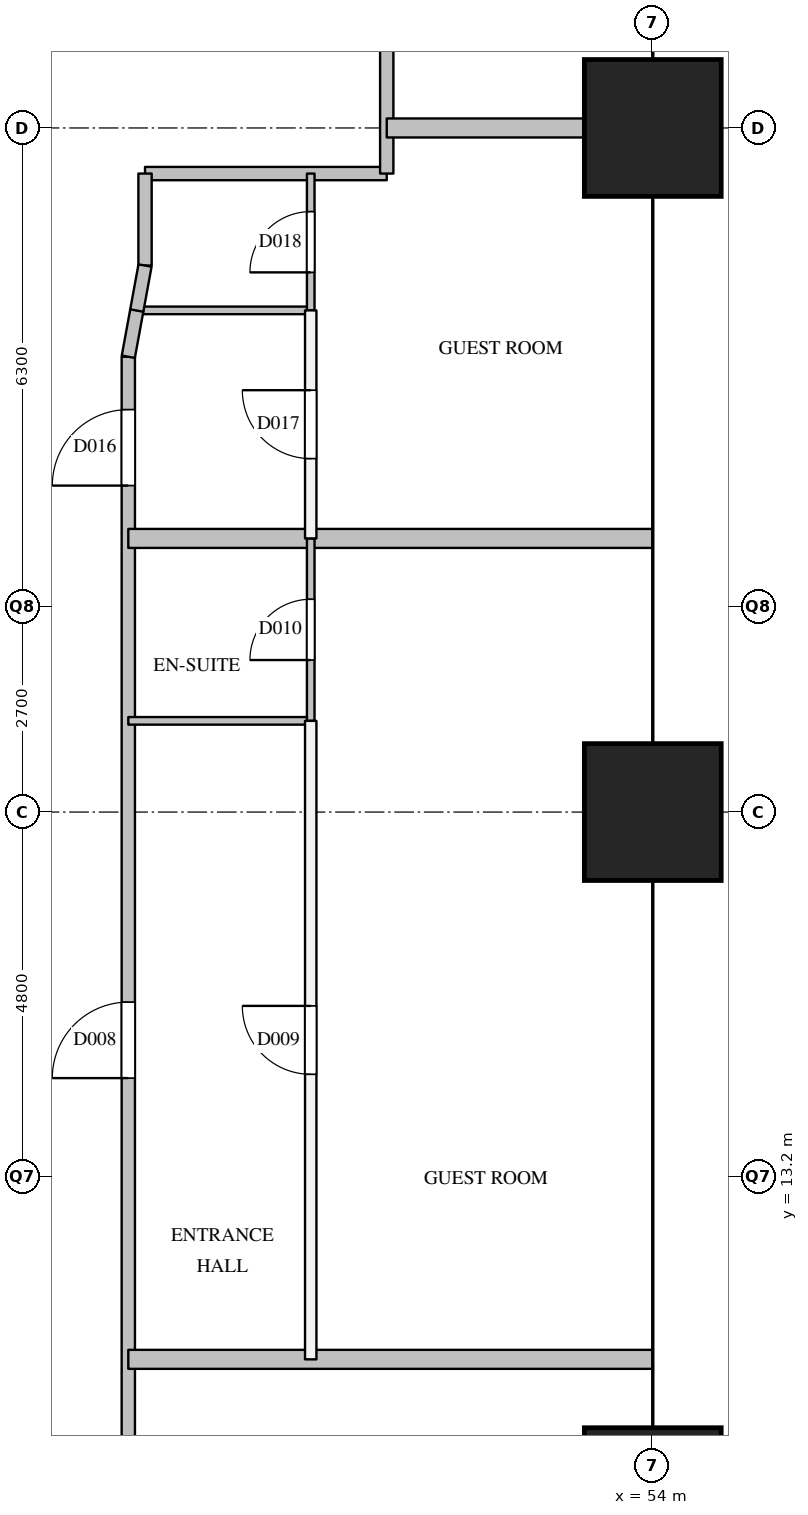
"""IFC4 building model, lengths in metres.
Left out: names, types, materials, properties, quantities, classifications, styles, units other than length and angle.
Written with IfcOpenShell. Run it as: python <this file> out.ifc"""

import sys

from ifc_helpers import new_model, si_unit, direction, frame, frame_2d, origin, origin_2d, place, context, subcontext, project, spatial, rectangle, extrude, element, fill, save


model = new_model("IFC4")
c1 = context("Model", 3, precision=1e-05, world=origin(), true_north=direction((0.0, 1.0)))
c2 = subcontext(c1, "Body", "Model", "MODEL_VIEW")
j1 = project(units=[si_unit("LENGTHUNIT", "METRE"), si_unit("PLANEANGLEUNIT", "RADIAN")], contexts=[c1])
p1 = place(None, origin())
s1 = spatial("IfcSite", under=j1, at=p1, CompositionType="ELEMENT")
p2 = place(p1, origin())
s2 = spatial("IfcBuilding", under=s1, at=p2, CompositionType="ELEMENT")
p3 = place(p2, frame((0.0, 0.0, 61.4)))
s3 = spatial("IfcBuildingStorey", under=s2, at=p3, CompositionType="ELEMENT", Elevation=61.4)
for number, where, z_axis, x_axis in (
    (1, (54.0, 9.0, 0.0), (0.0, 0.0, 1.0), (1.0, 0.0, 0.0)),
    (2, (54.0, 18.0, 0.0), (0.0, 0.0, 1.0), (1.0, 0.0, 0.0)),
    (3, (54.0, 27.0, 0.0), (0.0, 0.0, 1.0), (1.0, 0.0, 0.0)),
):
    element("IfcColumn", number, at=place(p3, frame(where, z_axis=z_axis, x_axis=x_axis)), inside=s3, PredefinedType="COLUMN", context=c2, shape_type="SweptSolid", body=[
        extrude(rectangle(XDim=1.8, YDim=1.8, at=origin_2d()), origin(), (0.0, 0.0, 1.0), 3.8),
    ])
p4 = place(p3, frame((47.32, 26.4, 0.0), z_axis=(0.0, 0.0, 1.0), x_axis=(1.0, 0.0, 0.0)))
e4 = element("IfcWall", 4, at=p4, inside=s3, PredefinedType="PARTITIONING", context=c2, shape_type="SweptSolid", body=[
    extrude(rectangle(XDim=3.18, YDim=0.175, at=frame_2d((1.59, 0.0))), origin(), (0.0, 0.0, 1.0), 3.5),
])
p5 = place(p3, frame((47.1, 6.9, 0.0), z_axis=(0.0, 0.0, 1.0), x_axis=(0.0, 1.0, 0.0)))
e5 = element("IfcWall", 5, at=p5, inside=s3, PredefinedType="PARTITIONING", context=c2, shape_type="SweptSolid", body=[
    extrude(rectangle(XDim=17.09, YDim=0.175, at=frame_2d((8.545, 0.0))), origin(), (0.0, 0.0, 1.0), 3.5),
])
p6 = place(p5, frame((7.6, 0.0, 0.0)))
e6 = element("IfcOpeningElement", 6, at=p6, cuts=e5, PredefinedType="OPENING", context=c2, shape_type="SweptSolid", body=[
    extrude(rectangle(XDim=1.0, YDim=2.1, at=frame_2d((0.5, 1.05))), frame((0.0, 0.097, 0.0), z_axis=(0.0, -1.0, 0.0), x_axis=(1.0, 0.0, 0.0)), (0.0, 0.0, 1.0), 0.195),
])
p7 = place(p5, frame((15.395, 0.0, 0.0)))
e7 = element("IfcOpeningElement", 7, at=p7, cuts=e5, PredefinedType="OPENING", context=c2, shape_type="SweptSolid", body=[
    extrude(rectangle(XDim=1.0, YDim=2.1, at=frame_2d((0.5, 1.05))), frame((0.0, 0.097, 0.0), z_axis=(0.0, -1.0, 0.0), x_axis=(1.0, 0.0, 0.0)), (0.0, 0.0, 1.0), 0.195),
])
p8 = place(p3, frame((47.32, 25.19, 0.0), z_axis=(0.0, 0.0, 1.0), x_axis=(0.0, 1.0, 0.0)))
e8 = element("IfcWall", 8, at=p8, inside=s3, PredefinedType="PARTITIONING", context=c2, shape_type="SweptSolid", body=[
    extrude(rectangle(XDim=1.21, YDim=0.175, at=frame_2d((0.605, 0.0))), origin(), (0.0, 0.0, 1.0), 3.5),
])
p9 = place(p3, frame((50.5, 26.4, 0.0), z_axis=(0.0, 0.0, 1.0), x_axis=(0.0, 1.0, 0.0)))
e9 = element("IfcWall", 9, at=p9, inside=s3, PredefinedType="PARTITIONING", context=c2, shape_type="SweptSolid", body=[
    extrude(rectangle(XDim=25.7, YDim=0.175, at=frame_2d((12.85, 0.0))), origin(), (0.0, 0.0, 1.0), 2.5),
])
p10 = place(p9, frame((12.7, 0.0, 0.0)))
e10 = element("IfcOpeningElement", 10, at=p10, cuts=e9, PredefinedType="OPENING", context=c2, shape_type="SweptSolid", body=[
    extrude(rectangle(XDim=0.9, YDim=2.1, at=frame_2d((0.45, 1.05))), frame((0.0, 0.097, 0.0), z_axis=(0.0, -1.0, 0.0), x_axis=(1.0, 0.0, 0.0)), (0.0, 0.0, 1.0), 0.195),
])
p11 = place(p3, frame((49.5, 10.8, 0.0), z_axis=(0.0, 0.0, 1.0), x_axis=(0.0, 1.0, 0.0)))
e11 = element("IfcWall", 11, at=p11, inside=s3, PredefinedType="PARTITIONING", context=c2, shape_type="SweptSolid", body=[
    extrude(rectangle(XDim=8.4, YDim=0.15, at=frame_2d((4.2, 0.0))), origin(), (0.0, 0.0, 1.0), 3.5),
])
p12 = place(p11, frame((3.75, 0.0, 0.0)))
e12 = element("IfcOpeningElement", 12, at=p12, cuts=e11, PredefinedType="OPENING", context=c2, shape_type="SweptSolid", body=[
    extrude(rectangle(XDim=0.9, YDim=2.1, at=frame_2d((0.45, 1.05))), frame((0.0, 0.085, 0.0), z_axis=(0.0, -1.0, 0.0), x_axis=(1.0, 0.0, 0.0)), (0.0, 0.0, 1.0), 0.17),
])
p13 = place(p3, frame((49.5, 21.6, 0.0), z_axis=(0.0, 0.0, 1.0), x_axis=(0.0, 1.0, 0.0)))
e13 = element("IfcWall", 13, at=p13, inside=s3, PredefinedType="PARTITIONING", context=c2, shape_type="SweptSolid", body=[
    extrude(rectangle(XDim=3.0, YDim=0.15, at=frame_2d((1.5, 0.0))), origin(), (0.0, 0.0, 1.0), 3.5),
])
p14 = place(p13, frame((1.05, 0.0, 0.0)))
e14 = element("IfcOpeningElement", 14, at=p14, cuts=e13, PredefinedType="OPENING", context=c2, shape_type="SweptSolid", body=[
    extrude(rectangle(XDim=0.9, YDim=2.1, at=frame_2d((0.45, 1.05))), frame((0.0, 0.085, 0.0), z_axis=(0.0, -1.0, 0.0), x_axis=(1.0, 0.0, 0.0)), (0.0, 0.0, 1.0), 0.17),
])
for number, where, z_axis, x_axis in (
    (15, (47.1, 10.8, 0.0), (0.0, 0.0, 1.0), (1.0, 0.0, 0.0)),
    (16, (47.1, 21.6, 0.0), (0.0, 0.0, 1.0), (1.0, 0.0, 0.0)),
):
    element("IfcWall", number, at=place(p3, frame(where, z_axis=z_axis, x_axis=x_axis)), inside=s3, PredefinedType="PARTITIONING", context=c2, shape_type="SweptSolid", body=[
        extrude(rectangle(XDim=6.9, YDim=0.25, at=frame_2d((3.45, 0.0))), origin(), (0.0, 0.0, 1.0), 2.5),
    ])
p15 = place(p3, frame((50.5, 27.0, 0.0), z_axis=(0.0, 0.0, 1.0), x_axis=(1.0, 0.0, 0.0)))
e17 = element("IfcWall", 17, at=p15, inside=s3, PredefinedType="PARTITIONING", context=c2, shape_type="SweptSolid", body=[
    extrude(rectangle(XDim=3.5, YDim=0.25, at=frame_2d((1.75, 0.0))), origin(), (0.0, 0.0, 1.0), 2.5),
])
p16 = place(p3, frame((47.1, 19.2, 0.0), z_axis=(0.0, 0.0, 1.0), x_axis=(1.0, 0.0, 0.0)))
e18 = element("IfcWall", 18, at=p16, inside=s3, PredefinedType="PARTITIONING", context=c2, shape_type="SweptSolid", body=[
    extrude(rectangle(XDim=2.4, YDim=0.1, at=frame_2d((1.2, 0.0))), origin(), (0.0, 0.0, 1.0), 3.5),
])
p17 = place(p3, frame((47.212, 24.6, 0.0), z_axis=(0.0, 0.0, 1.0), x_axis=(1.0, 0.0, 0.0)))
e19 = element("IfcWall", 19, at=p17, inside=s3, PredefinedType="PARTITIONING", context=c2, shape_type="SweptSolid", body=[
    extrude(rectangle(XDim=2.288, YDim=0.1, at=frame_2d((1.144, 0.0))), origin(), (0.0, 0.0, 1.0), 3.5),
])
p18 = place(p3, frame((49.5, 19.2, 0.0), z_axis=(0.0, 0.0, 1.0), x_axis=(0.0, 1.0, 0.0)))
e20 = element("IfcWall", 20, at=p18, inside=s3, PredefinedType="PARTITIONING", context=c2, shape_type="SweptSolid", body=[
    extrude(rectangle(XDim=2.4, YDim=0.1, at=frame_2d((1.2, 0.0))), origin(), (0.0, 0.0, 1.0), 3.5),
])
p19 = place(p18, frame((0.8, 0.0, 0.0)))
e21 = element("IfcOpeningElement", 21, at=p19, cuts=e20, PredefinedType="OPENING", context=c2, shape_type="SweptSolid", body=[
    extrude(rectangle(XDim=0.8, YDim=2.1, at=frame_2d((0.4, 1.05))), frame((0.0, 0.06, 0.0), z_axis=(0.0, -1.0, 0.0), x_axis=(1.0, 0.0, 0.0)), (0.0, 0.0, 1.0), 0.12),
])
p20 = place(p3, frame((49.5, 24.6, 0.0), z_axis=(0.0, 0.0, 1.0), x_axis=(0.0, 1.0, 0.0)))
e22 = element("IfcWall", 22, at=p20, inside=s3, PredefinedType="PARTITIONING", context=c2, shape_type="SweptSolid", body=[
    extrude(rectangle(XDim=1.8, YDim=0.1, at=frame_2d((0.9, 0.0))), origin(), (0.0, 0.0, 1.0), 3.5),
])
p21 = place(p20, frame((0.5, 0.0, 0.0)))
e23 = element("IfcOpeningElement", 23, at=p21, cuts=e22, PredefinedType="OPENING", context=c2, shape_type="SweptSolid", body=[
    extrude(rectangle(XDim=0.8, YDim=2.1, at=frame_2d((0.4, 1.05))), frame((0.0, 0.06, 0.0), z_axis=(0.0, -1.0, 0.0), x_axis=(1.0, 0.0, 0.0)), (0.0, 0.0, 1.0), 0.12),
])
p22 = place(p3, frame((47.212, 24.602, 0.0), z_axis=(0.0, 0.0, 1.0), x_axis=(-0.180093775654, -0.983649445672, 0.0)))
e24 = element("IfcWall", 24, at=p22, inside=s3, PredefinedType="PARTITIONING", context=c2, shape_type="SweptSolid", body=[
    extrude(rectangle(XDim=0.622, YDim=0.175, at=frame_2d((0.311, 0.0))), origin(), (0.0, 0.0, 1.0), 3.5),
])
p23 = place(p3, frame((47.32, 25.19, 0.0), z_axis=(0.0, 0.0, 1.0), x_axis=(-0.180491370225, -0.983576568079, 0.0)))
e25 = element("IfcWall", 25, at=p23, inside=s3, PredefinedType="PARTITIONING", context=c2, shape_type="SweptSolid", body=[
    extrude(rectangle(XDim=0.602, YDim=0.175, at=frame_2d((0.301, 0.0))), origin(), (0.0, 0.0, 1.0), 3.5),
])
p24 = place(p6, origin())
e26 = element("IfcDoor", 26, at=p24, inside=s3, OperationType="SINGLE_SWING_LEFT", PredefinedType="DOOR", context=c2, shape_type="SweptSolid", body=[
    extrude(rectangle(XDim=1.0, YDim=2.1, at=frame_2d((0.5, 1.05))), frame((0.0, 0.025, 0.0), z_axis=(0.0, -1.0, 0.0), x_axis=(1.0, 0.0, 0.0)), (0.0, 0.0, 1.0), 0.05),
])
fill(e6, e26)
p25 = place(p12, origin())
e27 = element("IfcDoor", 27, at=p25, inside=s3, OperationType="SINGLE_SWING_RIGHT", PredefinedType="DOOR", context=c2, shape_type="SweptSolid", body=[
    extrude(rectangle(XDim=0.9, YDim=2.1, at=frame_2d((0.45, 1.05))), frame((0.0, 0.025, 0.0), z_axis=(0.0, -1.0, 0.0), x_axis=(1.0, 0.0, 0.0)), (0.0, 0.0, 1.0), 0.05),
])
fill(e12, e27)
p26 = place(p19, origin())
e28 = element("IfcDoor", 28, at=p26, inside=s3, OperationType="SINGLE_SWING_LEFT", PredefinedType="DOOR", context=c2, shape_type="SweptSolid", body=[
    extrude(rectangle(XDim=0.8, YDim=2.1, at=frame_2d((0.4, 1.05))), frame((0.0, 0.025, 0.0), z_axis=(0.0, -1.0, 0.0), x_axis=(1.0, 0.0, 0.0)), (0.0, 0.0, 1.0), 0.05),
])
fill(e21, e28)
p27 = place(p7, origin())
e29 = element("IfcDoor", 29, at=p27, inside=s3, OperationType="SINGLE_SWING_LEFT", PredefinedType="DOOR", context=c2, shape_type="SweptSolid", body=[
    extrude(rectangle(XDim=1.0, YDim=2.1, at=frame_2d((0.5, 1.05))), frame((0.0, 0.025, 0.0), z_axis=(0.0, -1.0, 0.0), x_axis=(1.0, 0.0, 0.0)), (0.0, 0.0, 1.0), 0.05),
])
fill(e7, e29)
p28 = place(p14, origin())
e30 = element("IfcDoor", 30, at=p28, inside=s3, OperationType="SINGLE_SWING_RIGHT", PredefinedType="DOOR", context=c2, shape_type="SweptSolid", body=[
    extrude(rectangle(XDim=0.9, YDim=2.1, at=frame_2d((0.45, 1.05))), frame((0.0, 0.025, 0.0), z_axis=(0.0, -1.0, 0.0), x_axis=(1.0, 0.0, 0.0)), (0.0, 0.0, 1.0), 0.05),
])
fill(e14, e30)
p29 = place(p21, origin())
e31 = element("IfcDoor", 31, at=p29, inside=s3, OperationType="SINGLE_SWING_LEFT", PredefinedType="DOOR", context=c2, shape_type="SweptSolid", body=[
    extrude(rectangle(XDim=0.8, YDim=2.1, at=frame_2d((0.4, 1.05))), frame((0.0, 0.025, 0.0), z_axis=(0.0, -1.0, 0.0), x_axis=(1.0, 0.0, 0.0)), (0.0, 0.0, 1.0), 0.05),
])
fill(e23, e31)
save(model, sys.argv[1])
